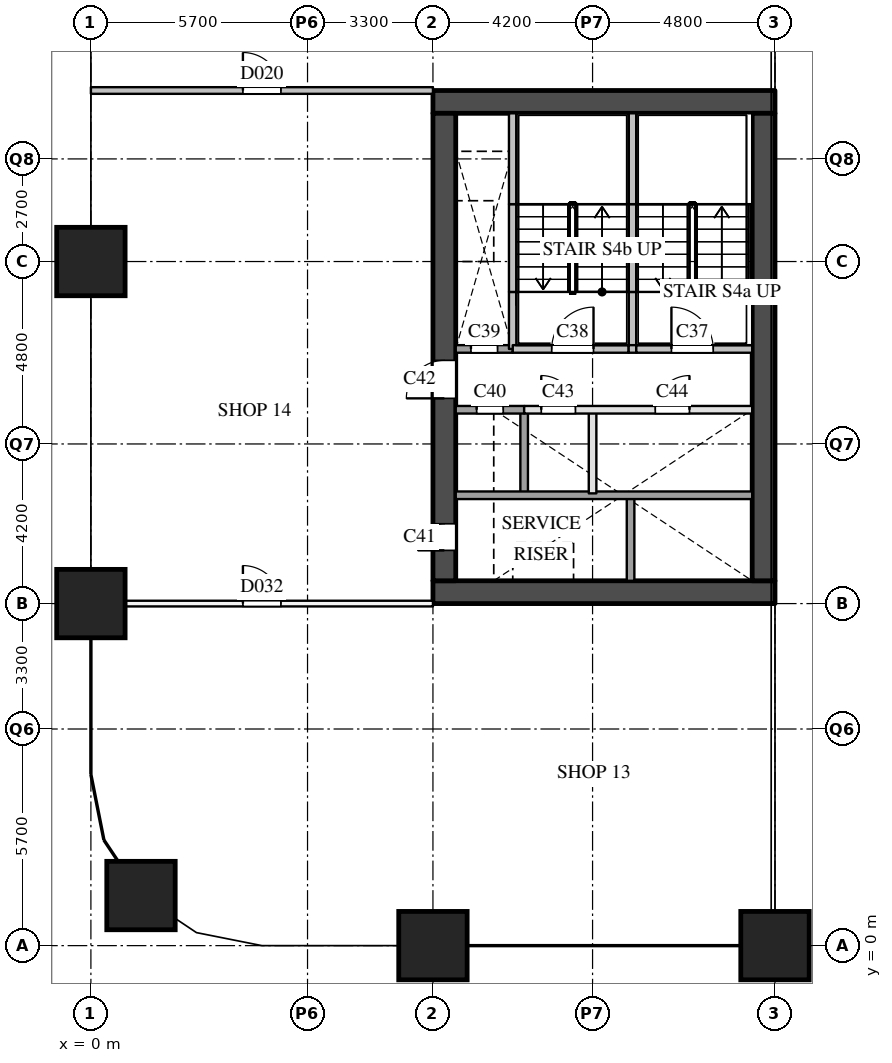
"""IFC4 building model, lengths in metres.
Left out: names, types, materials, properties, quantities, classifications, styles, units other than length and angle.
Written with IfcOpenShell. Run it as: python <this file> out.ifc"""

import sys

from ifc_helpers import new_model, si_unit, direction, frame, frame_2d, origin, origin_2d, place, context, subcontext, project, spatial, rectangle, extrude, element, fill, save


model = new_model("IFC4")
c1 = context("Model", 3, precision=1e-05, world=origin(), true_north=direction((0.0, 1.0)))
c2 = subcontext(c1, "Body", "Model", "MODEL_VIEW")
j1 = project(units=[si_unit("LENGTHUNIT", "METRE"), si_unit("PLANEANGLEUNIT", "RADIAN")], contexts=[c1])
p1 = place(None, origin())
s1 = spatial("IfcSite", under=j1, at=p1, CompositionType="ELEMENT")
p2 = place(p1, origin())
s2 = spatial("IfcBuilding", under=s1, at=p2, CompositionType="ELEMENT")
p3 = place(p2, frame((0.0, 0.0, 21.0)))
s3 = spatial("IfcBuildingStorey", under=s2, at=p3, CompositionType="ELEMENT", Elevation=21.0)
for number, where, z_axis, x_axis in (
    (1, (1.318, 1.318, 0.0), (0.0, 0.0, 1.0), (1.0, 0.0, 0.0)),
    (2, (0.0, 9.0, 0.0), (0.0, 0.0, 1.0), (1.0, 0.0, 0.0)),
    (3, (0.0, 18.0, 0.0), (0.0, 0.0, 1.0), (1.0, 0.0, 0.0)),
    (4, (9.0, 0.0, 0.0), (0.0, 0.0, 1.0), (1.0, 0.0, 0.0)),
    (5, (18.0, 0.0, 0.0), (0.0, 0.0, 1.0), (1.0, 0.0, 0.0)),
):
    element("IfcColumn", number, at=place(p3, frame(where, z_axis=z_axis, x_axis=x_axis)), inside=s3, PredefinedType="COLUMN", context=c2, shape_type="SweptSolid", body=[
        extrude(rectangle(XDim=1.8, YDim=1.8, at=origin_2d()), origin(), (0.0, 0.0, 1.0), 5.0),
    ])
for number, where, z_axis, x_axis in (
    (6, (9.0, 9.3, 0.0), (0.0, 0.0, 1.0), (1.0, 0.0, 0.0)),
    (7, (9.0, 22.2, 0.0), (0.0, 0.0, 1.0), (1.0, 0.0, 0.0)),
):
    element("IfcWall", number, at=place(p3, frame(where, z_axis=z_axis, x_axis=x_axis)), inside=s3, PredefinedType="SHEAR", context=c2, shape_type="SweptSolid", body=[
        extrude(rectangle(XDim=9.0, YDim=0.6, at=frame_2d((4.5, 0.0))), origin(), (0.0, 0.0, 1.0), 4.55),
    ])
p4 = place(p3, frame((9.3, 9.6, 0.0), z_axis=(0.0, 0.0, 1.0), x_axis=(0.0, 1.0, 0.0)))
e8 = element("IfcWall", 8, at=p4, inside=s3, PredefinedType="SHEAR", context=c2, shape_type="SweptSolid", body=[
    extrude(rectangle(XDim=12.3, YDim=0.6, at=frame_2d((6.15, 0.0))), origin(), (0.0, 0.0, 1.0), 4.55),
])
p5 = place(p4, frame((0.8, 0.0, 0.0)))
e9 = element("IfcOpeningElement", 9, at=p5, cuts=e8, PredefinedType="OPENING", context=c2, shape_type="SweptSolid", body=[
    extrude(rectangle(XDim=0.7, YDim=2.1, at=frame_2d((0.35, 1.05))), frame((0.0, 0.31, 0.0), z_axis=(0.0, -1.0, 0.0), x_axis=(1.0, 0.0, 0.0)), (0.0, 0.0, 1.0), 0.62),
])
p6 = place(p4, frame((4.8, 0.0, 0.0)))
e10 = element("IfcOpeningElement", 10, at=p6, cuts=e8, PredefinedType="OPENING", context=c2, shape_type="SweptSolid", body=[
    extrude(rectangle(XDim=1.0, YDim=2.1, at=frame_2d((0.5, 1.05))), frame((0.0, 0.31, 0.0), z_axis=(0.0, -1.0, 0.0), x_axis=(1.0, 0.0, 0.0)), (0.0, 0.0, 1.0), 0.62),
])
p7 = place(p3, frame((17.7, 9.6, 0.0), z_axis=(0.0, 0.0, 1.0), x_axis=(0.0, 1.0, 0.0)))
e11 = element("IfcWall", 11, at=p7, inside=s3, PredefinedType="SHEAR", context=c2, shape_type="SweptSolid", body=[
    extrude(rectangle(XDim=12.3, YDim=0.6, at=frame_2d((6.15, 0.0))), origin(), (0.0, 0.0, 1.0), 4.55),
])
p8 = place(p3, frame((11.1, 15.7, 0.0), z_axis=(0.0, 0.0, 1.0), x_axis=(0.0, 1.0, 0.0)))
e12 = element("IfcWall", 12, at=p8, inside=s3, PredefinedType="SOLIDWALL", context=c2, shape_type="SweptSolid", body=[
    extrude(rectangle(XDim=1.5, YDim=0.2, at=frame_2d((0.75, 0.0))), origin(), (0.0, 0.0, 1.0), 4.55),
])
p9 = place(p3, frame((11.1, 17.2, 0.0), z_axis=(0.0, 0.0, 1.0), x_axis=(0.0, 1.0, 0.0)))
e13 = element("IfcWall", 13, at=p9, inside=s3, PredefinedType="SOLIDWALL", context=c2, shape_type="SweptSolid", body=[
    extrude(rectangle(XDim=2.31, YDim=0.2, at=frame_2d((1.155, 0.0))), origin(), (0.0, 0.0, 1.0), 4.55),
])
p10 = place(p3, frame((11.1, 19.51, 0.0), z_axis=(0.0, 0.0, 1.0), x_axis=(0.0, 1.0, 0.0)))
e14 = element("IfcWall", 14, at=p10, inside=s3, PredefinedType="SOLIDWALL", context=c2, shape_type="SweptSolid", body=[
    extrude(rectangle(XDim=2.39, YDim=0.2, at=frame_2d((1.195, 0.0))), origin(), (0.0, 0.0, 1.0), 4.55),
])
p11 = place(p3, frame((11.4, 11.9, 0.0), z_axis=(0.0, 0.0, 1.0), x_axis=(0.0, 1.0, 0.0)))
e15 = element("IfcWall", 15, at=p11, inside=s3, PredefinedType="SOLIDWALL", context=c2, shape_type="SweptSolid", body=[
    extrude(rectangle(XDim=2.2, YDim=0.2, at=frame_2d((1.1, 0.0))), origin(), (0.0, 0.0, 1.0), 4.55),
])
p12 = place(p3, frame((13.2, 11.9, 0.0), z_axis=(0.0, 0.0, 1.0), x_axis=(0.0, 1.0, 0.0)))
e16 = element("IfcWall", 16, at=p12, inside=s3, PredefinedType="PARTITIONING", context=c2, shape_type="SweptSolid", body=[
    extrude(rectangle(XDim=2.2, YDim=0.2, at=frame_2d((1.1, 0.0))), origin(), (0.0, 0.0, 1.0), 4.55),
])
p13 = place(p3, frame((14.2, 9.6, 0.0), z_axis=(0.0, 0.0, 1.0), x_axis=(0.0, 1.0, 0.0)))
e17 = element("IfcWall", 17, at=p13, inside=s3, PredefinedType="SOLIDWALL", context=c2, shape_type="SweptSolid", body=[
    extrude(rectangle(XDim=2.3, YDim=0.2, at=frame_2d((1.15, 0.0))), origin(), (0.0, 0.0, 1.0), 4.55),
])
p14 = place(p3, frame((14.25, 15.7, 0.0), z_axis=(0.0, 0.0, 1.0), x_axis=(0.0, 1.0, 0.0)))
e18 = element("IfcWall", 18, at=p14, inside=s3, PredefinedType="SOLIDWALL", context=c2, shape_type="SweptSolid", body=[
    extrude(rectangle(XDim=1.5, YDim=0.2, at=frame_2d((0.75, 0.0))), origin(), (0.0, 0.0, 1.0), 4.55),
])
p15 = place(p3, frame((14.25, 17.2, 0.0), z_axis=(0.0, 0.0, 1.0), x_axis=(0.0, 1.0, 0.0)))
e19 = element("IfcWall", 19, at=p15, inside=s3, PredefinedType="SOLIDWALL", context=c2, shape_type="SweptSolid", body=[
    extrude(rectangle(XDim=2.31, YDim=0.2, at=frame_2d((1.155, 0.0))), origin(), (0.0, 0.0, 1.0), 4.55),
])
p16 = place(p3, frame((14.25, 19.51, 0.0), z_axis=(0.0, 0.0, 1.0), x_axis=(0.0, 1.0, 0.0)))
e20 = element("IfcWall", 20, at=p16, inside=s3, PredefinedType="SOLIDWALL", context=c2, shape_type="SweptSolid", body=[
    extrude(rectangle(XDim=2.39, YDim=0.2, at=frame_2d((1.195, 0.0))), origin(), (0.0, 0.0, 1.0), 4.55),
])
p17 = place(p3, frame((9.6, 11.85, 0.0), z_axis=(0.0, 0.0, 1.0), x_axis=(1.0, 0.0, 0.0)))
e21 = element("IfcWall", 21, at=p17, inside=s3, PredefinedType="SOLIDWALL", context=c2, shape_type="SweptSolid", body=[
    extrude(rectangle(XDim=7.8, YDim=0.2, at=frame_2d((3.9, 0.0))), origin(), (0.0, 0.0, 1.0), 4.55),
])
p18 = place(p3, frame((11.4, 14.1, 0.0), z_axis=(0.0, 0.0, 1.0), x_axis=(1.0, 0.0, 0.0)))
e22 = element("IfcWall", 22, at=p18, inside=s3, PredefinedType="PARTITIONING", context=c2, shape_type="SweptSolid", body=[
    extrude(rectangle(XDim=6.0, YDim=0.2, at=frame_2d((3.0, 0.0))), origin(), (0.0, 0.0, 1.0), 4.55),
])
p19 = place(p18, frame((0.45, 0.0, 0.0)))
e23 = element("IfcOpeningElement", 23, at=p19, cuts=e22, PredefinedType="OPENING", context=c2, shape_type="SweptSolid", body=[
    extrude(rectangle(XDim=0.9, YDim=2.1, at=frame_2d((0.45, 1.05))), frame((0.0, 0.11, 0.0), z_axis=(0.0, -1.0, 0.0), x_axis=(1.0, 0.0, 0.0)), (0.0, 0.0, 1.0), 0.22),
])
p20 = place(p18, frame((3.45, 0.0, 0.0)))
e24 = element("IfcOpeningElement", 24, at=p20, cuts=e22, PredefinedType="OPENING", context=c2, shape_type="SweptSolid", body=[
    extrude(rectangle(XDim=0.9, YDim=2.1, at=frame_2d((0.45, 1.05))), frame((0.0, 0.11, 0.0), z_axis=(0.0, -1.0, 0.0), x_axis=(1.0, 0.0, 0.0)), (0.0, 0.0, 1.0), 0.22),
])
p21 = place(p3, frame((9.6, 14.1, 0.0), z_axis=(0.0, 0.0, 1.0), x_axis=(1.0, 0.0, 0.0)))
e25 = element("IfcWall", 25, at=p21, inside=s3, PredefinedType="SOLIDWALL", context=c2, shape_type="SweptSolid", body=[
    extrude(rectangle(XDim=1.8, YDim=0.2, at=frame_2d((0.9, 0.0))), origin(), (0.0, 0.0, 1.0), 4.55),
])
p22 = place(p21, frame((0.55, 0.0, 0.0)))
e26 = element("IfcOpeningElement", 26, at=p22, cuts=e25, PredefinedType="OPENING", context=c2, shape_type="SweptSolid", body=[
    extrude(rectangle(XDim=0.7, YDim=2.1, at=frame_2d((0.35, 1.05))), frame((0.0, 0.11, 0.0), z_axis=(0.0, -1.0, 0.0), x_axis=(1.0, 0.0, 0.0)), (0.0, 0.0, 1.0), 0.22),
])
p23 = place(p3, frame((9.6, 15.7, 0.0), z_axis=(0.0, 0.0, 1.0), x_axis=(1.0, 0.0, 0.0)))
e27 = element("IfcWall", 27, at=p23, inside=s3, PredefinedType="SOLIDWALL", context=c2, shape_type="SweptSolid", body=[
    extrude(rectangle(XDim=1.5, YDim=0.2, at=frame_2d((0.75, 0.0))), origin(), (0.0, 0.0, 1.0), 4.55),
])
p24 = place(p23, frame((0.4, 0.0, 0.0)))
e28 = element("IfcOpeningElement", 28, at=p24, cuts=e27, PredefinedType="OPENING", context=c2, shape_type="SweptSolid", body=[
    extrude(rectangle(XDim=0.7, YDim=2.1, at=frame_2d((0.35, 1.05))), frame((0.0, 0.11, 0.0), z_axis=(0.0, -1.0, 0.0), x_axis=(1.0, 0.0, 0.0)), (0.0, 0.0, 1.0), 0.22),
])
p25 = place(p3, frame((11.1, 15.7, 0.0), z_axis=(0.0, 0.0, 1.0), x_axis=(1.0, 0.0, 0.0)))
e29 = element("IfcWall", 29, at=p25, inside=s3, PredefinedType="SOLIDWALL", context=c2, shape_type="SweptSolid", body=[
    extrude(rectangle(XDim=3.05, YDim=0.2, at=frame_2d((1.525, 0.0))), origin(), (0.0, 0.0, 1.0), 4.55),
])
p26 = place(p25, frame((1.025, 0.0, 0.0)))
e30 = element("IfcOpeningElement", 30, at=p26, cuts=e29, PredefinedType="OPENING", context=c2, shape_type="SweptSolid", body=[
    extrude(rectangle(XDim=1.1, YDim=2.1, at=frame_2d((0.55, 1.05))), frame((0.0, 0.11, 0.0), z_axis=(0.0, -1.0, 0.0), x_axis=(1.0, 0.0, 0.0)), (0.0, 0.0, 1.0), 0.22),
])
p27 = place(p3, frame((14.15, 15.7, 0.0), z_axis=(0.0, 0.0, 1.0), x_axis=(1.0, 0.0, 0.0)))
e31 = element("IfcWall", 31, at=p27, inside=s3, PredefinedType="SOLIDWALL", context=c2, shape_type="SweptSolid", body=[
    extrude(rectangle(XDim=0.2, YDim=0.2, at=frame_2d((0.1, 0.0))), origin(), (0.0, 0.0, 1.0), 4.55),
])
p28 = place(p3, frame((14.35, 15.7, 0.0), z_axis=(0.0, 0.0, 1.0), x_axis=(1.0, 0.0, 0.0)))
e32 = element("IfcWall", 32, at=p28, inside=s3, PredefinedType="SOLIDWALL", context=c2, shape_type="SweptSolid", body=[
    extrude(rectangle(XDim=3.05, YDim=0.2, at=frame_2d((1.525, 0.0))), origin(), (0.0, 0.0, 1.0), 4.55),
])
p29 = place(p28, frame((0.925, 0.0, 0.0)))
e33 = element("IfcOpeningElement", 33, at=p29, cuts=e32, PredefinedType="OPENING", context=c2, shape_type="SweptSolid", body=[
    extrude(rectangle(XDim=1.1, YDim=2.1, at=frame_2d((0.55, 1.05))), frame((0.0, 0.11, 0.0), z_axis=(0.0, -1.0, 0.0), x_axis=(1.0, 0.0, 0.0)), (0.0, 0.0, 1.0), 0.22),
])
p30 = place(p3, frame((0.0, 22.5, 0.0), z_axis=(0.0, 0.0, 1.0), x_axis=(1.0, 0.0, 0.0)))
e34 = element("IfcWall", 34, at=p30, inside=s3, PredefinedType="PARTITIONING", context=c2, shape_type="SweptSolid", body=[
    extrude(rectangle(XDim=9.0, YDim=0.175, at=frame_2d((4.5, 0.0))), origin(), (0.0, 0.0, 1.0), 3.55),
])
p31 = place(p30, frame((4.0, 0.0, 0.0)))
e35 = element("IfcOpeningElement", 35, at=p31, cuts=e34, PredefinedType="OPENING", context=c2, shape_type="SweptSolid", body=[
    extrude(rectangle(XDim=1.0, YDim=2.1, at=frame_2d((0.5, 1.05))), frame((0.0, 0.097, 0.0), z_axis=(0.0, -1.0, 0.0), x_axis=(1.0, 0.0, 0.0)), (0.0, 0.0, 1.0), 0.195),
])
p32 = place(p3, frame((0.0, 9.0, 0.0), z_axis=(0.0, 0.0, 1.0), x_axis=(1.0, 0.0, 0.0)))
e36 = element("IfcWall", 36, at=p32, inside=s3, PredefinedType="PARTITIONING", context=c2, shape_type="SweptSolid", body=[
    extrude(rectangle(XDim=9.0, YDim=0.15, at=frame_2d((4.5, 0.0))), origin(), (0.0, 0.0, 1.0), 4.55),
])
p33 = place(p32, frame((4.0, 0.0, 0.0)))
e37 = element("IfcOpeningElement", 37, at=p33, cuts=e36, PredefinedType="OPENING", context=c2, shape_type="SweptSolid", body=[
    extrude(rectangle(XDim=1.0, YDim=2.1, at=frame_2d((0.5, 1.05))), frame((0.0, 0.085, 0.0), z_axis=(0.0, -1.0, 0.0), x_axis=(1.0, 0.0, 0.0)), (0.0, 0.0, 1.0), 0.17),
])
p34 = place(p29, origin())
e38 = element("IfcDoor", 38, at=p34, inside=s3, OperationType="SINGLE_SWING_LEFT", PredefinedType="DOOR", context=c2, shape_type="SweptSolid", body=[
    extrude(rectangle(XDim=1.1, YDim=2.1, at=frame_2d((0.55, 1.05))), frame((0.0, 0.025, 0.0), z_axis=(0.0, -1.0, 0.0), x_axis=(1.0, 0.0, 0.0)), (0.0, 0.0, 1.0), 0.05),
])
fill(e33, e38)
p35 = place(p26, origin())
e39 = element("IfcDoor", 39, at=p35, inside=s3, OperationType="SINGLE_SWING_RIGHT", PredefinedType="DOOR", context=c2, shape_type="SweptSolid", body=[
    extrude(rectangle(XDim=1.1, YDim=2.1, at=frame_2d((0.55, 1.05))), frame((0.0, 0.025, 0.0), z_axis=(0.0, -1.0, 0.0), x_axis=(1.0, 0.0, 0.0)), (0.0, 0.0, 1.0), 0.05),
])
fill(e30, e39)
p36 = place(p24, origin())
e40 = element("IfcDoor", 40, at=p36, inside=s3, OperationType="SINGLE_SWING_LEFT", PredefinedType="DOOR", context=c2, shape_type="SweptSolid", body=[
    extrude(rectangle(XDim=0.7, YDim=2.1, at=frame_2d((0.35, 1.05))), frame((0.0, 0.025, 0.0), z_axis=(0.0, -1.0, 0.0), x_axis=(1.0, 0.0, 0.0)), (0.0, 0.0, 1.0), 0.05),
])
fill(e28, e40)
p37 = place(p22, origin())
e41 = element("IfcDoor", 41, at=p37, inside=s3, OperationType="SINGLE_SWING_LEFT", PredefinedType="DOOR", context=c2, shape_type="SweptSolid", body=[
    extrude(rectangle(XDim=0.7, YDim=2.1, at=frame_2d((0.35, 1.05))), frame((0.0, 0.025, 0.0), z_axis=(0.0, -1.0, 0.0), x_axis=(1.0, 0.0, 0.0)), (0.0, 0.0, 1.0), 0.05),
])
fill(e26, e41)
p38 = place(p5, origin())
e42 = element("IfcDoor", 42, at=p38, inside=s3, OperationType="SINGLE_SWING_LEFT", PredefinedType="DOOR", context=c2, shape_type="SweptSolid", body=[
    extrude(rectangle(XDim=0.7, YDim=2.1, at=frame_2d((0.35, 1.05))), frame((0.0, 0.025, 0.0), z_axis=(0.0, -1.0, 0.0), x_axis=(1.0, 0.0, 0.0)), (0.0, 0.0, 1.0), 0.05),
])
fill(e9, e42)
p39 = place(p6, origin())
e43 = element("IfcDoor", 43, at=p39, inside=s3, OperationType="SINGLE_SWING_LEFT", PredefinedType="DOOR", context=c2, shape_type="SweptSolid", body=[
    extrude(rectangle(XDim=1.0, YDim=2.1, at=frame_2d((0.5, 1.05))), frame((0.0, 0.025, 0.0), z_axis=(0.0, -1.0, 0.0), x_axis=(1.0, 0.0, 0.0)), (0.0, 0.0, 1.0), 0.05),
])
fill(e10, e43)
p40 = place(p19, origin())
e44 = element("IfcDoor", 44, at=p40, inside=s3, OperationType="SINGLE_SWING_LEFT", PredefinedType="DOOR", context=c2, shape_type="SweptSolid", body=[
    extrude(rectangle(XDim=0.9, YDim=2.1, at=frame_2d((0.45, 1.05))), frame((0.0, 0.025, 0.0), z_axis=(0.0, -1.0, 0.0), x_axis=(1.0, 0.0, 0.0)), (0.0, 0.0, 1.0), 0.05),
])
fill(e23, e44)
p41 = place(p20, origin())
e45 = element("IfcDoor", 45, at=p41, inside=s3, OperationType="SINGLE_SWING_RIGHT", PredefinedType="DOOR", context=c2, shape_type="SweptSolid", body=[
    extrude(rectangle(XDim=0.9, YDim=2.1, at=frame_2d((0.45, 1.05))), frame((0.0, 0.025, 0.0), z_axis=(0.0, -1.0, 0.0), x_axis=(1.0, 0.0, 0.0)), (0.0, 0.0, 1.0), 0.05),
])
fill(e24, e45)
p42 = place(p31, origin())
e46 = element("IfcDoor", 46, at=p42, inside=s3, OperationType="SINGLE_SWING_LEFT", PredefinedType="DOOR", context=c2, shape_type="SweptSolid", body=[
    extrude(rectangle(XDim=1.0, YDim=2.1, at=frame_2d((0.5, 1.05))), frame((0.0, 0.025, 0.0), z_axis=(0.0, -1.0, 0.0), x_axis=(1.0, 0.0, 0.0)), (0.0, 0.0, 1.0), 0.05),
])
fill(e35, e46)
p43 = place(p33, origin())
e47 = element("IfcDoor", 47, at=p43, inside=s3, OperationType="SINGLE_SWING_LEFT", PredefinedType="DOOR", context=c2, shape_type="SweptSolid", body=[
    extrude(rectangle(XDim=1.0, YDim=2.1, at=frame_2d((0.5, 1.05))), frame((0.0, 0.025, 0.0), z_axis=(0.0, -1.0, 0.0), x_axis=(1.0, 0.0, 0.0)), (0.0, 0.0, 1.0), 0.05),
])
fill(e37, e47)
save(model, sys.argv[1])
